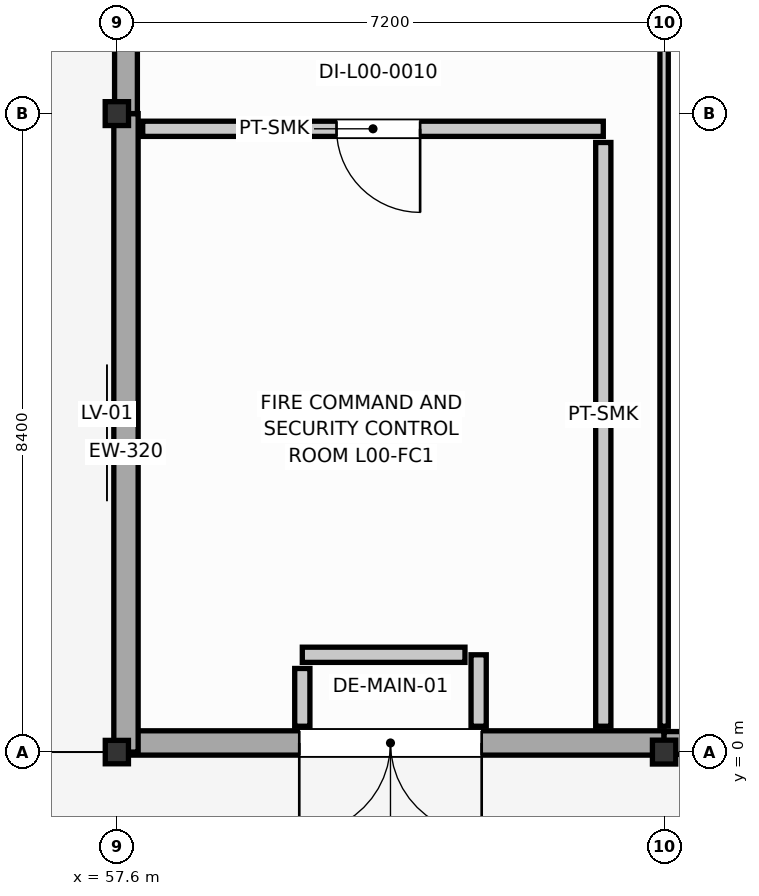
"""IFC4 building model, lengths in metres.
Left out: names, types, materials, properties, quantities, classifications, styles, units other than length and angle.
Written with IfcOpenShell. Run it as: python <this file> out.ifc"""

import sys

from ifc_helpers import new_model, si_unit, direction, frame, frame_2d, origin, origin_2d, place, context, subcontext, project, spatial, rectangle, i_section, extrude, element, fill, save


model = new_model("IFC4")
c1 = context("Model", 3, precision=1e-05, world=origin(), true_north=direction((0.0, 1.0)))
c2 = subcontext(c1, "Body", "Model", "MODEL_VIEW")
j1 = project(units=[si_unit("LENGTHUNIT", "METRE"), si_unit("PLANEANGLEUNIT", "RADIAN")], contexts=[c1])
p1 = place(None, origin())
s1 = spatial("IfcSite", under=j1, at=p1, CompositionType="ELEMENT")
p2 = place(p1, origin())
s2 = spatial("IfcBuilding", under=s1, at=p2, CompositionType="ELEMENT")
p3 = place(p2, origin())
s3 = spatial("IfcBuildingStorey", under=s2, at=p3, CompositionType="ELEMENT", Elevation=0.0)
p4 = place(p3, frame((57.6, 0.0, 0.0), z_axis=(0.0, 0.0, 1.0), x_axis=(1.0, 0.0, 0.0)))
e1 = element("IfcColumn", 1, at=p4, inside=s3, PredefinedType="COLUMN", context=c2, shape_type="SweptSolid", body=[
    extrude(i_section(OverallWidth=0.305, OverallDepth=0.308, WebThickness=0.01, FlangeThickness=0.015, FilletRadius=0.015, at=origin_2d()), origin(), (0.0, 0.0, 1.0), 4.8),
])
for number, where, z_axis, x_axis in (
    (2, (57.6, 8.4, 0.0), (0.0, 0.0, 1.0), (1.0, 0.0, 0.0)),
    (3, (64.8, 0.0, 0.0), (0.0, 0.0, 1.0), (1.0, 0.0, 0.0)),
):
    element("IfcColumn", number, at=place(p3, frame(where, z_axis=z_axis, x_axis=x_axis)), inside=s3, PredefinedType="COLUMN", context=c2, shape_type="SweptSolid", body=[
        extrude(i_section(OverallWidth=0.307, OverallDepth=0.314, WebThickness=0.012, FlangeThickness=0.019, FilletRadius=0.016, at=origin_2d()), origin(), (0.0, 0.0, 1.0), 4.8),
    ])
p5 = place(p3, frame((57.6, 0.12, 0.0), z_axis=(0.0, 0.0, 1.0), x_axis=(1.0, 0.0, 0.0)))
e4 = element("IfcWall", 4, at=p5, inside=s3, PredefinedType="SOLIDWALL", context=c2, shape_type="SweptSolid", body=[
    extrude(rectangle(XDim=7.2, YDim=0.32, at=frame_2d((3.6, 0.0))), origin(), (0.0, 0.0, 1.0), 4.082),
])
p6 = place(p5, frame((2.4, 0.0, 0.0)))
e5 = element("IfcOpeningElement", 5, at=p6, cuts=e4, PredefinedType="OPENING", context=c2, shape_type="SweptSolid", body=[
    extrude(rectangle(XDim=2.4, YDim=2.4, at=frame_2d((1.2, 1.2))), frame((0.0, 0.17, 0.0), z_axis=(0.0, -1.0, 0.0), x_axis=(1.0, 0.0, 0.0)), (0.0, 0.0, 1.0), 0.34),
])
p7 = place(p3, frame((64.8, 0.12, 0.0), z_axis=(0.0, 0.0, 1.0), x_axis=(1.0, 0.0, 0.0)))
e6 = element("IfcWall", 6, at=p7, inside=s3, PredefinedType="SOLIDWALL", context=c2, shape_type="SweptSolid", body=[
    extrude(rectangle(XDim=7.2, YDim=0.3, at=frame_2d((3.6, 0.0))), origin(), (0.0, 0.0, 1.0), 4.082),
])
p8 = place(p7, frame((3.075, 0.0, 0.95)))
e7 = element("IfcOpeningElement", 7, at=p8, cuts=e6, PredefinedType="OPENING", context=c2, shape_type="SweptSolid", body=[
    extrude(rectangle(XDim=1.05, YDim=1.15, at=frame_2d((0.525, 0.575))), frame((0.0, 0.16, 0.0), z_axis=(0.0, -1.0, 0.0), x_axis=(1.0, 0.0, 0.0)), (0.0, 0.0, 1.0), 0.32),
])
p9 = place(p3, frame((57.72, 0.0, 0.0), z_axis=(0.0, 0.0, 1.0), x_axis=(0.0, 1.0, 0.0)))
e8 = element("IfcWall", 8, at=p9, inside=s3, PredefinedType="SOLIDWALL", context=c2, shape_type="SweptSolid", body=[
    extrude(rectangle(XDim=8.4, YDim=0.32, at=frame_2d((4.2, 0.0))), origin(), (0.0, 0.0, 1.0), 3.2),
])
p10 = place(p3, frame((57.72, 8.4, 0.0), z_axis=(0.0, 0.0, 1.0), x_axis=(0.0, 1.0, 0.0)))
e9 = element("IfcWall", 9, at=p10, inside=s3, PredefinedType="SOLIDWALL", context=c2, shape_type="SweptSolid", body=[
    extrude(rectangle(XDim=8.4, YDim=0.3, at=frame_2d((4.2, 0.0))), origin(), (0.0, 0.0, 1.0), 3.2),
])
p11 = place(p10, frame((3.1, 0.0, 0.0)))
e10 = element("IfcOpeningElement", 10, at=p11, cuts=e9, PredefinedType="OPENING", context=c2, shape_type="SweptSolid", body=[
    extrude(rectangle(XDim=2.2, YDim=2.4, at=frame_2d((1.1, 1.2))), frame((0.0, 0.16, 0.0), z_axis=(0.0, -1.0, 0.0), x_axis=(1.0, 0.0, 0.0)), (0.0, 0.0, 1.0), 0.32),
])
p12 = place(p3, frame((62.36, 0.34, 0.0), z_axis=(0.0, 0.0, 1.0), x_axis=(0.0, 1.0, 0.0)))
e11 = element("IfcWall", 11, at=p12, inside=s3, PredefinedType="PARTITIONING", context=c2, shape_type="SweptSolid", body=[
    extrude(rectangle(XDim=0.94, YDim=0.2, at=frame_2d((0.47, 0.0))), origin(), (0.0, 0.0, 1.0), 4.545),
])
p13 = place(p3, frame((62.18, 1.28, 0.0), z_axis=(0.0, 0.0, 1.0), x_axis=(-1.0, 0.0, 0.0)))
e12 = element("IfcWall", 12, at=p13, inside=s3, PredefinedType="PARTITIONING", context=c2, shape_type="SweptSolid", body=[
    extrude(rectangle(XDim=2.14, YDim=0.2, at=frame_2d((1.07, 0.0))), origin(), (0.0, 0.0, 1.0), 4.545),
])
p14 = place(p3, frame((60.04, 1.1, 0.0), z_axis=(0.0, 0.0, 1.0), x_axis=(0.0, -1.0, 0.0)))
e13 = element("IfcWall", 13, at=p14, inside=s3, PredefinedType="PARTITIONING", context=c2, shape_type="SweptSolid", body=[
    extrude(rectangle(XDim=0.76, YDim=0.2, at=frame_2d((0.38, 0.0))), origin(), (0.0, 0.0, 1.0), 4.545),
])
p15 = place(p3, frame((57.94, 8.2, 0.0), z_axis=(0.0, 0.0, 1.0), x_axis=(1.0, 0.0, 0.0)))
e14 = element("IfcWall", 14, at=p15, inside=s3, PredefinedType="PARTITIONING", context=c2, shape_type="SweptSolid", body=[
    extrude(rectangle(XDim=6.06, YDim=0.2, at=frame_2d((3.03, 0.0))), origin(), (0.0, 0.0, 1.0), 4.545),
])
p16 = place(p15, frame((2.55, 0.0, 0.0)))
e15 = element("IfcOpeningElement", 15, at=p16, cuts=e14, PredefinedType="OPENING", context=c2, shape_type="SweptSolid", body=[
    extrude(rectangle(XDim=1.1, YDim=2.1, at=frame_2d((0.55, 1.05))), frame((0.0, 0.11, 0.0), z_axis=(0.0, -1.0, 0.0), x_axis=(1.0, 0.0, 0.0)), (0.0, 0.0, 1.0), 0.22),
])
p17 = place(p3, frame((64.0, 8.02, 0.0), z_axis=(0.0, 0.0, 1.0), x_axis=(0.0, -1.0, 0.0)))
e16 = element("IfcWall", 16, at=p17, inside=s3, PredefinedType="PARTITIONING", context=c2, shape_type="SweptSolid", body=[
    extrude(rectangle(XDim=7.68, YDim=0.2, at=frame_2d((3.84, 0.0))), origin(), (0.0, 0.0, 1.0), 4.545),
])
p18 = place(p3, frame((64.8, 0.34, 0.0), z_axis=(0.0, 0.0, 1.0), x_axis=(0.0, 1.0, 0.0)))
e17 = element("IfcWall", 17, at=p18, inside=s3, PredefinedType="MOVABLE", context=c2, shape_type="SweptSolid", body=[
    extrude(rectangle(XDim=24.46, YDim=0.11, at=frame_2d((12.23, 0.0))), origin(), (0.0, 0.0, 1.0), 4.545),
])
p19 = place(p6, frame((2.4, 0.0, 0.0), z_axis=(0.0, 0.0, 1.0), x_axis=(-1.0, 0.0, 0.0)))
e18 = element("IfcDoor", 18, at=p19, inside=s3, OperationType="DOUBLE_DOOR_SINGLE_SWING", PredefinedType="DOOR", context=c2, shape_type="SweptSolid", body=[
    extrude(rectangle(XDim=2.4, YDim=2.4, at=frame_2d((1.2, 1.2))), frame((0.0, 0.025, 0.0), z_axis=(0.0, -1.0, 0.0), x_axis=(1.0, 0.0, 0.0)), (0.0, 0.0, 1.0), 0.05),
])
fill(e5, e18)
p20 = place(p16, frame((1.1, 0.0, 0.0), z_axis=(0.0, 0.0, 1.0), x_axis=(-1.0, 0.0, 0.0)))
e19 = element("IfcDoor", 19, at=p20, inside=s3, OperationType="SINGLE_SWING_LEFT", PredefinedType="DOOR", context=c2, shape_type="SweptSolid", body=[
    extrude(rectangle(XDim=1.1, YDim=2.1, at=frame_2d((0.55, 1.05))), frame((0.0, 0.025, 0.0), z_axis=(0.0, -1.0, 0.0), x_axis=(1.0, 0.0, 0.0)), (0.0, 0.0, 1.0), 0.05),
])
fill(e15, e19)
save(model, sys.argv[1])
